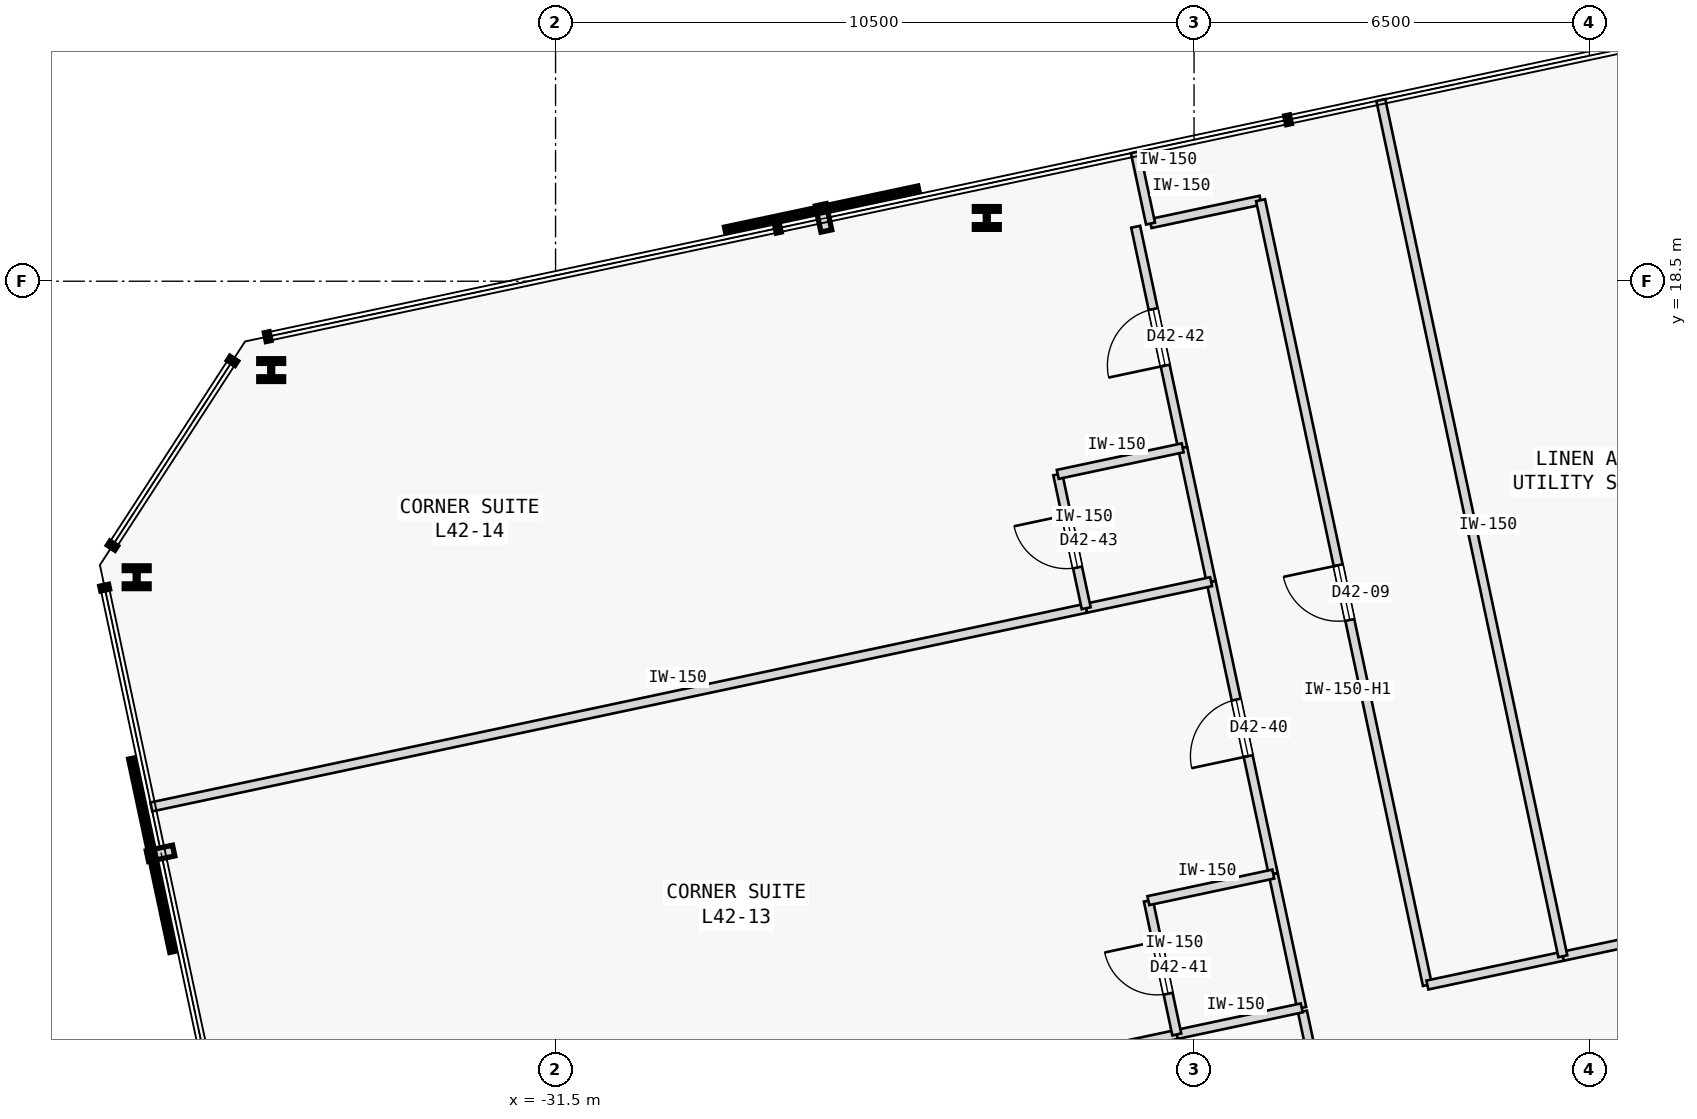
"""IFC4 building model, lengths in metres.
Left out: names, types, materials, properties, quantities, classifications, styles, units other than length and angle.
Written with IfcOpenShell. Run it as: python <this file> out.ifc"""

import sys

from ifc_helpers import new_model, si_unit, direction, frame, frame_2d, origin, origin_2d, place, context, subcontext, project, spatial, rectangle, i_section, extrude, element, fill, save


model = new_model("IFC4")
c1 = context("Model", 3, precision=1e-05, world=origin(), true_north=direction((0.0, 1.0)))
c2 = subcontext(c1, "Body", "Model", "MODEL_VIEW")
j1 = project(units=[si_unit("LENGTHUNIT", "METRE"), si_unit("PLANEANGLEUNIT", "RADIAN")], contexts=[c1])
p1 = place(None, origin())
s1 = spatial("IfcSite", under=j1, at=p1, CompositionType="ELEMENT")
p2 = place(p1, origin())
s2 = spatial("IfcBuilding", under=s1, at=p2, CompositionType="ELEMENT")
p3 = place(p2, frame((0.0, 0.0, 165.0)))
s3 = spatial("IfcBuildingStorey", under=s2, at=p3, CompositionType="ELEMENT", Elevation=165.0)
for number, where, z_axis, x_axis in (
    (1, (-24.408, 19.54, 0.0), (0.0, 0.0, 1.0), (1.0, 0.0, 0.0)),
    (2, (-36.176, 17.039, 0.0), (0.0, 0.0, 1.0), (1.0, 0.0, 0.0)),
    (3, (-38.389, 13.632, 0.0), (0.0, 0.0, 1.0), (1.0, 0.0, 0.0)),
):
    element("IfcColumn", number, at=place(p3, frame(where, z_axis=z_axis, x_axis=x_axis)), inside=s3, PredefinedType="COLUMN", context=c2, shape_type="SweptSolid", body=[
        extrude(i_section(OverallWidth=0.409, OverallDepth=0.374, WebThickness=0.048, FlangeThickness=0.077, FilletRadius=0.015, at=origin_2d()), origin(), (0.0, 0.0, 1.0), 3.4),
    ])
p4 = place(p3, frame((-21.715, 19.448, 0.0), z_axis=(0.0, 0.0, 1.0), x_axis=(0.978160192495, 0.207852442415, 0.0)))
e4 = element("IfcWall", 4, at=p4, inside=s3, PredefinedType="PARTITIONING", context=c2, shape_type="SweptSolid", body=[
    extrude(rectangle(XDim=1.85, YDim=0.15, at=frame_2d((0.925, 0.0))), origin(), (0.0, 0.0, 1.0), 3.175),
])
p5 = place(p3, frame((-17.162, 6.926, 0.0), z_axis=(0.0, 0.0, 1.0), x_axis=(-0.207911421929, 0.978147657888, 0.0)))
e5 = element("IfcWall", 5, at=p5, inside=s3, PredefinedType="PARTITIONING", context=c2, shape_type="SweptSolid", body=[
    extrude(rectangle(XDim=13.195, YDim=0.15, at=frame_2d((6.598, 0.0))), origin(), (0.0, 0.0, 1.0), 2.725),
])
p6 = place(p5, frame((6.137, 0.0, 0.0)))
e6 = element("IfcOpeningElement", 6, at=p6, cuts=e5, PredefinedType="OPENING", context=c2, shape_type="SweptSolid", body=[
    extrude(rectangle(XDim=0.92, YDim=2.15, at=frame_2d((0.46, 1.075))), frame((0.0, 0.085, 0.0), z_axis=(0.0, -1.0, 0.0), x_axis=(1.0, 0.0, 0.0)), (0.0, 0.0, 1.0), 0.17),
])
p7 = place(p3, frame((-17.162, 6.926, 0.0), z_axis=(0.0, 0.0, 1.0), x_axis=(0.978124500572, 0.208020338863, 0.0)))
e7 = element("IfcWall", 7, at=p7, inside=s3, PredefinedType="PARTITIONING", context=c2, shape_type="SweptSolid", body=[
    extrude(rectangle(XDim=2.277, YDim=0.15, at=frame_2d((1.138, 0.0))), origin(), (0.0, 0.0, 1.0), 3.175),
])
p8 = place(p3, frame((-14.935, 7.399, 0.0), z_axis=(0.0, 0.0, 1.0), x_axis=(0.978153289129, 0.20788492722, 0.0)))
e8 = element("IfcWall", 8, at=p8, inside=s3, PredefinedType="PARTITIONING", context=c2, shape_type="SweptSolid", body=[
    extrude(rectangle(XDim=4.128, YDim=0.15, at=frame_2d((2.064, 0.0))), origin(), (0.0, 0.0, 1.0), 3.175),
])
p9 = place(p8, frame((1.604, 0.0, 0.0)))
e9 = element("IfcOpeningElement", 9, at=p9, cuts=e8, PredefinedType="OPENING", context=c2, shape_type="SweptSolid", body=[
    extrude(rectangle(XDim=0.92, YDim=2.15, at=frame_2d((0.46, 1.075))), frame((0.0, 0.085, 0.0), z_axis=(0.0, -1.0, 0.0), x_axis=(1.0, 0.0, 0.0)), (0.0, 0.0, 1.0), 0.17),
])
p10 = place(p3, frame((-18.207, 1.74, 0.0), z_axis=(0.0, 0.0, 1.0), x_axis=(-0.20793874598, 0.97814184959, 0.0)))
e10 = element("IfcWall", 10, at=p10, inside=s3, PredefinedType="PARTITIONING", context=c2, shape_type="SweptSolid", body=[
    extrude(rectangle(XDim=4.855, YDim=0.15, at=frame_2d((2.427, 0.0))), origin(), (0.0, 0.0, 1.0), 3.175),
])
p11 = place(p10, frame((1.952, 0.0, 0.0)))
e11 = element("IfcOpeningElement", 11, at=p11, cuts=e10, PredefinedType="OPENING", context=c2, shape_type="SweptSolid", body=[
    extrude(rectangle(XDim=0.95, YDim=2.15, at=frame_2d((0.475, 1.075))), frame((0.0, 0.085, 0.0), z_axis=(0.0, -1.0, 0.0), x_axis=(1.0, 0.0, 0.0)), (0.0, 0.0, 1.0), 0.17),
])
p12 = place(p3, frame((-19.697, 8.751, 0.0), z_axis=(0.0, 0.0, 1.0), x_axis=(-0.207887265829, 0.978152792107, 0.0)))
e12 = element("IfcWall", 12, at=p12, inside=s3, PredefinedType="PARTITIONING", context=c2, shape_type="SweptSolid", body=[
    extrude(rectangle(XDim=4.916, YDim=0.15, at=frame_2d((2.458, 0.0))), origin(), (0.0, 0.0, 1.0), 3.175),
])
p13 = place(p12, frame((1.983, 0.0, 0.0)))
e13 = element("IfcOpeningElement", 13, at=p13, cuts=e12, PredefinedType="OPENING", context=c2, shape_type="SweptSolid", body=[
    extrude(rectangle(XDim=0.95, YDim=2.15, at=frame_2d((0.475, 1.075))), frame((0.0, 0.085, 0.0), z_axis=(0.0, -1.0, 0.0), x_axis=(1.0, 0.0, 0.0)), (0.0, 0.0, 1.0), 0.17),
])
p14 = place(p3, frame((-19.229, 6.55, 0.0), z_axis=(0.0, 0.0, 1.0), x_axis=(-0.207891197838, 0.978151956427, 0.0)))
e14 = element("IfcWall", 14, at=p14, inside=s3, PredefinedType="PARTITIONING", context=c2, shape_type="SweptSolid", body=[
    extrude(rectangle(XDim=2.25, YDim=0.15, at=frame_2d((1.125, 0.0))), origin(), (0.0, 0.0, 1.0), 3.175),
])
p15 = place(p3, frame((-21.187, 15.76, 0.0), z_axis=(0.0, 0.0, 1.0), x_axis=(-0.207949879289, 0.978139482745, 0.0)))
e15 = element("IfcWall", 15, at=p15, inside=s3, PredefinedType="PARTITIONING", context=c2, shape_type="SweptSolid", body=[
    extrude(rectangle(XDim=3.717, YDim=0.15, at=frame_2d((1.858, 0.0))), origin(), (0.0, 0.0, 1.0), 3.175),
])
p16 = place(p15, frame((1.384, 0.0, 0.0)))
e16 = element("IfcOpeningElement", 16, at=p16, cuts=e15, PredefinedType="OPENING", context=c2, shape_type="SweptSolid", body=[
    extrude(rectangle(XDim=0.95, YDim=2.15, at=frame_2d((0.475, 1.075))), frame((0.0, 0.085, 0.0), z_axis=(0.0, -1.0, 0.0), x_axis=(1.0, 0.0, 0.0)), (0.0, 0.0, 1.0), 0.17),
])
p17 = place(p3, frame((-20.719, 13.559, 0.0), z_axis=(0.0, 0.0, 1.0), x_axis=(-0.207891197838, 0.978151956427, 0.0)))
e17 = element("IfcWall", 17, at=p17, inside=s3, PredefinedType="PARTITIONING", context=c2, shape_type="SweptSolid", body=[
    extrude(rectangle(XDim=2.25, YDim=0.15, at=frame_2d((1.125, 0.0))), origin(), (0.0, 0.0, 1.0), 3.175),
])
p18 = place(p3, frame((-14.935, 7.399, 0.0), z_axis=(0.0, 0.0, 1.0), x_axis=(-0.207899121568, 0.978150272326, 0.0)))
e18 = element("IfcWall", 18, at=p18, inside=s3, PredefinedType="PARTITIONING", context=c2, shape_type="SweptSolid", body=[
    extrude(rectangle(XDim=14.395, YDim=0.15, at=frame_2d((7.197, 0.0))), origin(), (0.0, 0.0, 1.0), 3.175),
])
p19 = place(p3, frame((-21.715, 19.448, 0.0), z_axis=(0.0, 0.0, 1.0), x_axis=(-0.20795853359, 0.978137642823, 0.0)))
e19 = element("IfcWall", 19, at=p19, inside=s3, PredefinedType="PARTITIONING", context=c2, shape_type="SweptSolid", body=[
    extrude(rectangle(XDim=1.2, YDim=0.15, at=frame_2d((0.6, 0.0))), origin(), (0.0, 0.0, 1.0), 3.175),
])
p20 = place(p3, frame((-36.658, 2.845, 0.0), z_axis=(0.0, 0.0, 1.0), x_axis=(0.978146137903, 0.207918572776, 0.0)))
e20 = element("IfcWall", 20, at=p20, inside=s3, PredefinedType="PARTITIONING", context=c2, shape_type="SweptSolid", body=[
    extrude(rectangle(XDim=15.718, YDim=0.15, at=frame_2d((7.859, 0.0))), origin(), (0.0, 0.0, 1.0), 2.725),
])
p21 = place(p3, frame((-21.283, 6.113, 0.0), z_axis=(0.0, 0.0, 1.0), x_axis=(0.978153236239, 0.207885176084, 0.0)))
e21 = element("IfcWall", 21, at=p21, inside=s3, PredefinedType="PARTITIONING", context=c2, shape_type="SweptSolid", body=[
    extrude(rectangle(XDim=2.1, YDim=0.15, at=frame_2d((1.05, 0.0))), origin(), (0.0, 0.0, 1.0), 3.175),
])
p22 = place(p3, frame((-21.283, 6.113, 0.0), z_axis=(0.0, 0.0, 1.0), x_axis=(-0.207891197838, 0.978151956427, 0.0)))
e22 = element("IfcWall", 22, at=p22, inside=s3, PredefinedType="PARTITIONING", context=c2, shape_type="SweptSolid", body=[
    extrude(rectangle(XDim=2.25, YDim=0.15, at=frame_2d((1.125, 0.0))), origin(), (0.0, 0.0, 1.0), 3.175),
])
p23 = place(p22, frame((0.685, 0.0, 0.0)))
e23 = element("IfcOpeningElement", 23, at=p23, cuts=e22, PredefinedType="OPENING", context=c2, shape_type="SweptSolid", body=[
    extrude(rectangle(XDim=0.88, YDim=2.15, at=frame_2d((0.44, 1.075))), frame((0.0, 0.085, 0.0), z_axis=(0.0, -1.0, 0.0), x_axis=(1.0, 0.0, 0.0)), (0.0, 0.0, 1.0), 0.17),
])
p24 = place(p3, frame((-21.751, 8.314, 0.0), z_axis=(0.0, 0.0, 1.0), x_axis=(0.978153236239, 0.207885176084, 0.0)))
e24 = element("IfcWall", 24, at=p24, inside=s3, PredefinedType="PARTITIONING", context=c2, shape_type="SweptSolid", body=[
    extrude(rectangle(XDim=2.1, YDim=0.15, at=frame_2d((1.05, 0.0))), origin(), (0.0, 0.0, 1.0), 3.175),
])
p25 = place(p3, frame((-38.148, 9.855, 0.0), z_axis=(0.0, 0.0, 1.0), x_axis=(0.978146137903, 0.207918572776, 0.0)))
e25 = element("IfcWall", 25, at=p25, inside=s3, PredefinedType="PARTITIONING", context=c2, shape_type="SweptSolid", body=[
    extrude(rectangle(XDim=15.718, YDim=0.15, at=frame_2d((7.859, 0.0))), origin(), (0.0, 0.0, 1.0), 3.175),
])
p26 = place(p3, frame((-22.773, 13.123, 0.0), z_axis=(0.0, 0.0, 1.0), x_axis=(0.97815826, 0.207861536591, 0.0)))
e26 = element("IfcWall", 26, at=p26, inside=s3, PredefinedType="PARTITIONING", context=c2, shape_type="SweptSolid", body=[
    extrude(rectangle(XDim=2.1, YDim=0.15, at=frame_2d((1.05, 0.0))), origin(), (0.0, 0.0, 1.0), 3.175),
])
p27 = place(p3, frame((-22.773, 13.123, 0.0), z_axis=(0.0, 0.0, 1.0), x_axis=(-0.207913264065, 0.978147266328, 0.0)))
e27 = element("IfcWall", 27, at=p27, inside=s3, PredefinedType="PARTITIONING", context=c2, shape_type="SweptSolid", body=[
    extrude(rectangle(XDim=2.25, YDim=0.15, at=frame_2d((1.125, 0.0))), origin(), (0.0, 0.0, 1.0), 3.175),
])
p28 = place(p27, frame((0.685, 0.0, 0.0)))
e28 = element("IfcOpeningElement", 28, at=p28, cuts=e27, PredefinedType="OPENING", context=c2, shape_type="SweptSolid", body=[
    extrude(rectangle(XDim=0.88, YDim=2.15, at=frame_2d((0.44, 1.075))), frame((0.0, 0.085, 0.0), z_axis=(0.0, -1.0, 0.0), x_axis=(1.0, 0.0, 0.0)), (0.0, 0.0, 1.0), 0.17),
])
p29 = place(p3, frame((-23.241, 15.323, 0.0), z_axis=(0.0, 0.0, 1.0), x_axis=(0.978134617382, 0.207972763311, 0.0)))
e29 = element("IfcWall", 29, at=p29, inside=s3, PredefinedType="PARTITIONING", context=c2, shape_type="SweptSolid", body=[
    extrude(rectangle(XDim=2.1, YDim=0.15, at=frame_2d((1.05, 0.0))), origin(), (0.0, 0.0, 1.0), 3.175),
])
p30 = place(p6, origin())
e30 = element("IfcDoor", 30, at=p30, inside=s3, OperationType="SINGLE_SWING_RIGHT", PredefinedType="DOOR", context=c2, shape_type="SweptSolid", body=[
    extrude(rectangle(XDim=0.92, YDim=2.15, at=frame_2d((0.46, 1.075))), frame((0.0, 0.025, 0.0), z_axis=(0.0, -1.0, 0.0), x_axis=(1.0, 0.0, 0.0)), (0.0, 0.0, 1.0), 0.05),
])
fill(e6, e30)
p31 = place(p13, origin())
e31 = element("IfcDoor", 31, at=p31, inside=s3, OperationType="SINGLE_SWING_LEFT", PredefinedType="DOOR", context=c2, shape_type="SweptSolid", body=[
    extrude(rectangle(XDim=0.95, YDim=2.15, at=frame_2d((0.475, 1.075))), frame((0.0, 0.025, 0.0), z_axis=(0.0, -1.0, 0.0), x_axis=(1.0, 0.0, 0.0)), (0.0, 0.0, 1.0), 0.05),
])
fill(e13, e31)
p32 = place(p23, origin())
e32 = element("IfcDoor", 32, at=p32, inside=s3, OperationType="SINGLE_SWING_RIGHT", PredefinedType="DOOR", context=c2, shape_type="SweptSolid", body=[
    extrude(rectangle(XDim=0.88, YDim=2.15, at=frame_2d((0.44, 1.075))), frame((0.0, 0.025, 0.0), z_axis=(0.0, -1.0, 0.0), x_axis=(1.0, 0.0, 0.0)), (0.0, 0.0, 1.0), 0.05),
])
fill(e23, e32)
p33 = place(p16, origin())
e33 = element("IfcDoor", 33, at=p33, inside=s3, OperationType="SINGLE_SWING_LEFT", PredefinedType="DOOR", context=c2, shape_type="SweptSolid", body=[
    extrude(rectangle(XDim=0.95, YDim=2.15, at=frame_2d((0.475, 1.075))), frame((0.0, 0.025, 0.0), z_axis=(0.0, -1.0, 0.0), x_axis=(1.0, 0.0, 0.0)), (0.0, 0.0, 1.0), 0.05),
])
fill(e16, e33)
p34 = place(p28, origin())
e34 = element("IfcDoor", 34, at=p34, inside=s3, OperationType="SINGLE_SWING_RIGHT", PredefinedType="DOOR", context=c2, shape_type="SweptSolid", body=[
    extrude(rectangle(XDim=0.88, YDim=2.15, at=frame_2d((0.44, 1.075))), frame((0.0, 0.025, 0.0), z_axis=(0.0, -1.0, 0.0), x_axis=(1.0, 0.0, 0.0)), (0.0, 0.0, 1.0), 0.05),
])
fill(e28, e34)
save(model, sys.argv[1])
